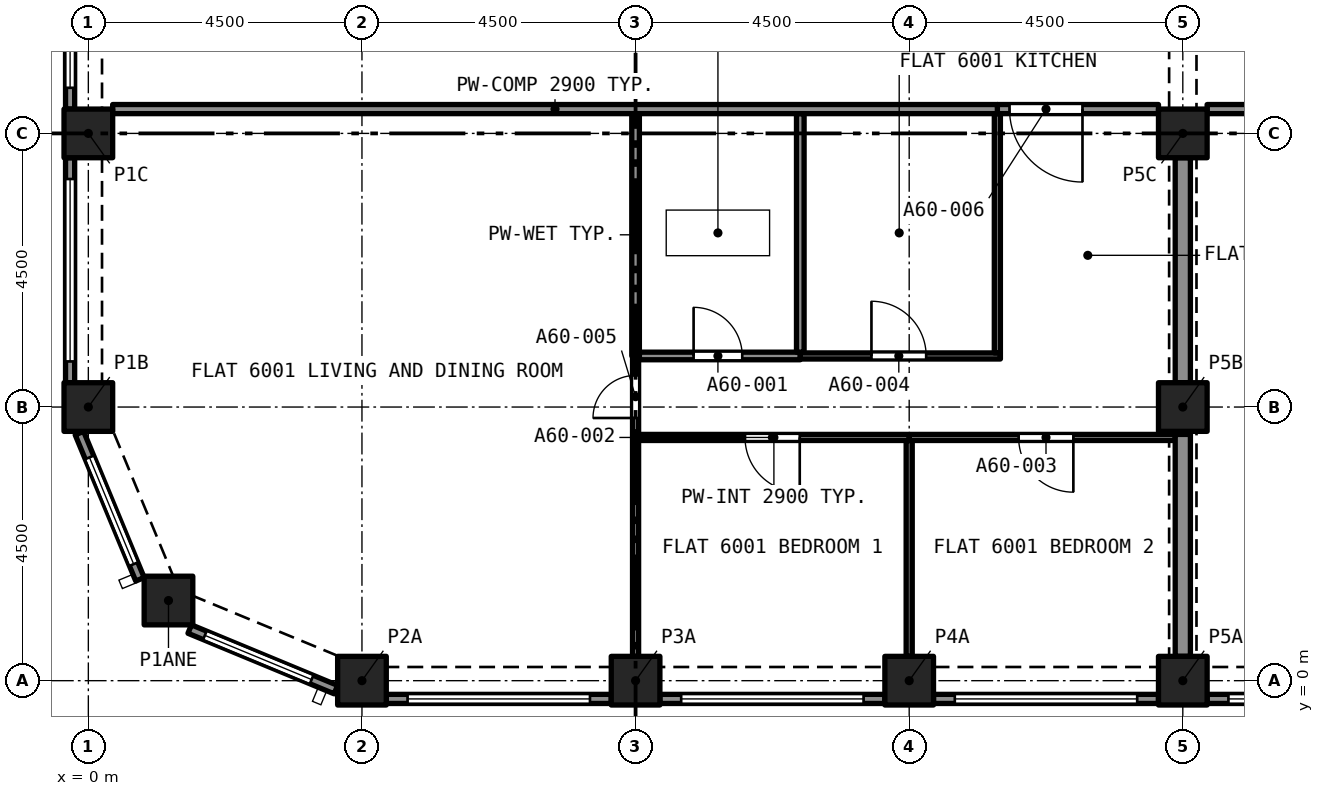
"""IFC4 building model, lengths in metres.
Left out: names, types, materials, properties, quantities, classifications, styles, units other than length and angle.
Written with IfcOpenShell. Run it as: python <this file> out.ifc"""

import sys

from ifc_helpers import new_model, si_unit, direction, frame, frame_2d, origin, origin_2d, place, context, subcontext, project, spatial, rectangle, extrude, element, fill, save


model = new_model("IFC4")
c1 = context("Model", 3, precision=1e-05, world=origin(), true_north=direction((0.0, 1.0)))
c2 = subcontext(c1, "Body", "Model", "MODEL_VIEW")
j1 = project(units=[si_unit("LENGTHUNIT", "METRE"), si_unit("PLANEANGLEUNIT", "RADIAN")], contexts=[c1])
p1 = place(None, origin())
s1 = spatial("IfcSite", under=j1, at=p1, CompositionType="ELEMENT")
p2 = place(p1, origin())
s2 = spatial("IfcBuilding", under=s1, at=p2, CompositionType="ELEMENT")
p3 = place(p2, frame((0.0, 0.0, 216.495)))
s3 = spatial("IfcBuildingStorey", under=s2, at=p3, CompositionType="ELEMENT", Elevation=216.495)
for number, where, z_axis, x_axis in (
    (1, (4.5, 0.0, 0.0), (0.0, 0.0, 1.0), (1.0, 0.0, 0.0)),
    (2, (9.0, 0.0, 0.0), (0.0, 0.0, 1.0), (1.0, 0.0, 0.0)),
    (3, (13.5, 0.0, 0.0), (0.0, 0.0, 1.0), (1.0, 0.0, 0.0)),
    (4, (18.0, 0.0, 0.0), (0.0, 0.0, 1.0), (1.0, 0.0, 0.0)),
    (5, (1.318, 1.318, 0.0), (0.0, 0.0, 1.0), (1.0, 0.0, 0.0)),
    (6, (0.0, 4.5, 0.0), (0.0, 0.0, 1.0), (1.0, 0.0, 0.0)),
    (7, (18.0, 4.5, 0.0), (0.0, 0.0, 1.0), (1.0, 0.0, 0.0)),
    (8, (0.0, 9.0, 0.0), (0.0, 0.0, 1.0), (1.0, 0.0, 0.0)),
    (9, (18.0, 9.0, 0.0), (0.0, 0.0, 1.0), (1.0, 0.0, 0.0)),
):
    element("IfcColumn", number, at=place(p3, frame(where, z_axis=z_axis, x_axis=x_axis)), inside=s3, PredefinedType="COLUMN", context=c2, shape_type="SweptSolid", body=[
        extrude(rectangle(XDim=0.8, YDim=0.8, at=origin_2d()), origin(), (0.0, 0.0, 1.0), 3.2),
    ])
p4 = place(p3, frame((-0.3, 9.4, 0.0), z_axis=(0.0, 0.0, 1.0), x_axis=(0.0, 1.0, 0.0)))
e10 = element("IfcWall", 10, at=p4, inside=s3, PredefinedType="SOLIDWALL", context=c2, shape_type="SweptSolid", body=[
    extrude(rectangle(XDim=3.7, YDim=0.15, at=frame_2d((1.85, 0.0))), origin(), (0.0, 0.0, 1.0), 3.2),
])
p5 = place(p4, frame((0.35, 0.0, 0.45)))
e11 = element("IfcOpeningElement", 11, at=p5, cuts=e10, PredefinedType="OPENING", context=c2, shape_type="SweptSolid", body=[
    extrude(rectangle(XDim=3.0, YDim=1.95, at=frame_2d((1.5, 0.975))), frame((0.0, 0.085, 0.0), z_axis=(0.0, -1.0, 0.0), x_axis=(1.0, 0.0, 0.0)), (0.0, 0.0, 1.0), 0.17),
])
p6 = place(p3, frame((-0.3, 4.9, 0.0), z_axis=(0.0, 0.0, 1.0), x_axis=(0.0, 1.0, 0.0)))
e12 = element("IfcWall", 12, at=p6, inside=s3, PredefinedType="SOLIDWALL", context=c2, shape_type="SweptSolid", body=[
    extrude(rectangle(XDim=3.7, YDim=0.15, at=frame_2d((1.85, 0.0))), origin(), (0.0, 0.0, 1.0), 3.2),
])
p7 = place(p6, frame((0.35, 0.0, 0.45)))
e13 = element("IfcOpeningElement", 13, at=p7, cuts=e12, PredefinedType="OPENING", context=c2, shape_type="SweptSolid", body=[
    extrude(rectangle(XDim=3.0, YDim=1.95, at=frame_2d((1.5, 0.975))), frame((0.0, 0.085, 0.0), z_axis=(0.0, -1.0, 0.0), x_axis=(1.0, 0.0, 0.0)), (0.0, 0.0, 1.0), 0.17),
])
p8 = place(p3, frame((0.849, 1.667, 0.0), z_axis=(0.0, 0.0, 1.0), x_axis=(-0.382669406082, 0.923885342263, 0.0)))
e14 = element("IfcWall", 14, at=p8, inside=s3, PredefinedType="SOLIDWALL", context=c2, shape_type="SweptSolid", body=[
    extrude(rectangle(XDim=2.602, YDim=0.15, at=frame_2d((1.301, 0.0))), origin(), (0.0, 0.0, 1.0), 3.2),
])
p9 = place(p8, frame((0.27, 0.0, 0.45)))
e15 = element("IfcOpeningElement", 15, at=p9, cuts=e14, PredefinedType="OPENING", context=c2, shape_type="SweptSolid", body=[
    extrude(rectangle(XDim=1.9, YDim=1.95, at=frame_2d((0.95, 0.975))), frame((0.0, 0.085, 0.0), z_axis=(0.0, -1.0, 0.0), x_axis=(1.0, 0.0, 0.0)), (0.0, 0.0, 1.0), 0.17),
])
p10 = place(p3, frame((4.071, -0.147, 0.0), z_axis=(0.0, 0.0, 1.0), x_axis=(-0.923885342263, 0.382669406082, 0.0)))
e16 = element("IfcWall", 16, at=p10, inside=s3, PredefinedType="SOLIDWALL", context=c2, shape_type="SweptSolid", body=[
    extrude(rectangle(XDim=2.602, YDim=0.15, at=frame_2d((1.301, 0.0))), origin(), (0.0, 0.0, 1.0), 3.2),
])
p11 = place(p10, frame((0.432, 0.0, 0.45)))
e17 = element("IfcOpeningElement", 17, at=p11, cuts=e16, PredefinedType="OPENING", context=c2, shape_type="SweptSolid", body=[
    extrude(rectangle(XDim=1.9, YDim=1.95, at=frame_2d((0.95, 0.975))), frame((0.0, 0.085, 0.0), z_axis=(0.0, -1.0, 0.0), x_axis=(1.0, 0.0, 0.0)), (0.0, 0.0, 1.0), 0.17),
])
p12 = place(p3, frame((8.6, -0.3, 0.0), z_axis=(0.0, 0.0, 1.0), x_axis=(-1.0, 0.0, 0.0)))
e18 = element("IfcWall", 18, at=p12, inside=s3, PredefinedType="SOLIDWALL", context=c2, shape_type="SweptSolid", body=[
    extrude(rectangle(XDim=3.7, YDim=0.15, at=frame_2d((1.85, 0.0))), origin(), (0.0, 0.0, 1.0), 3.2),
])
p13 = place(p12, frame((0.35, 0.0, 0.45)))
e19 = element("IfcOpeningElement", 19, at=p13, cuts=e18, PredefinedType="OPENING", context=c2, shape_type="SweptSolid", body=[
    extrude(rectangle(XDim=3.0, YDim=1.95, at=frame_2d((1.5, 0.975))), frame((0.0, 0.085, 0.0), z_axis=(0.0, -1.0, 0.0), x_axis=(1.0, 0.0, 0.0)), (0.0, 0.0, 1.0), 0.17),
])
p14 = place(p3, frame((13.1, -0.3, 0.0), z_axis=(0.0, 0.0, 1.0), x_axis=(-1.0, 0.0, 0.0)))
e20 = element("IfcWall", 20, at=p14, inside=s3, PredefinedType="SOLIDWALL", context=c2, shape_type="SweptSolid", body=[
    extrude(rectangle(XDim=3.7, YDim=0.15, at=frame_2d((1.85, 0.0))), origin(), (0.0, 0.0, 1.0), 3.2),
])
p15 = place(p14, frame((0.35, 0.0, 0.45)))
e21 = element("IfcOpeningElement", 21, at=p15, cuts=e20, PredefinedType="OPENING", context=c2, shape_type="SweptSolid", body=[
    extrude(rectangle(XDim=3.0, YDim=1.95, at=frame_2d((1.5, 0.975))), frame((0.0, 0.085, 0.0), z_axis=(0.0, -1.0, 0.0), x_axis=(1.0, 0.0, 0.0)), (0.0, 0.0, 1.0), 0.17),
])
p16 = place(p3, frame((17.6, -0.3, 0.0), z_axis=(0.0, 0.0, 1.0), x_axis=(-1.0, 0.0, 0.0)))
e22 = element("IfcWall", 22, at=p16, inside=s3, PredefinedType="SOLIDWALL", context=c2, shape_type="SweptSolid", body=[
    extrude(rectangle(XDim=3.7, YDim=0.15, at=frame_2d((1.85, 0.0))), origin(), (0.0, 0.0, 1.0), 3.2),
])
p17 = place(p16, frame((0.35, 0.0, 0.45)))
e23 = element("IfcOpeningElement", 23, at=p17, cuts=e22, PredefinedType="OPENING", context=c2, shape_type="SweptSolid", body=[
    extrude(rectangle(XDim=3.0, YDim=1.95, at=frame_2d((1.5, 0.975))), frame((0.0, 0.085, 0.0), z_axis=(0.0, -1.0, 0.0), x_axis=(1.0, 0.0, 0.0)), (0.0, 0.0, 1.0), 0.17),
])
p18 = place(p3, frame((22.1, -0.3, 0.0), z_axis=(0.0, 0.0, 1.0), x_axis=(-1.0, 0.0, 0.0)))
e24 = element("IfcWall", 24, at=p18, inside=s3, PredefinedType="SOLIDWALL", context=c2, shape_type="SweptSolid", body=[
    extrude(rectangle(XDim=3.7, YDim=0.15, at=frame_2d((1.85, 0.0))), origin(), (0.0, 0.0, 1.0), 3.2),
])
p19 = place(p18, frame((0.35, 0.0, 0.45)))
e25 = element("IfcOpeningElement", 25, at=p19, cuts=e24, PredefinedType="OPENING", context=c2, shape_type="SweptSolid", body=[
    extrude(rectangle(XDim=3.0, YDim=1.95, at=frame_2d((1.5, 0.975))), frame((0.0, 0.085, 0.0), z_axis=(0.0, -1.0, 0.0), x_axis=(1.0, 0.0, 0.0)), (0.0, 0.0, 1.0), 0.17),
])
p20 = place(p3, frame((9.062, 5.34, 0.0), z_axis=(0.0, 0.0, 1.0), x_axis=(1.0, 0.0, 0.0)))
e26 = element("IfcWall", 26, at=p20, inside=s3, PredefinedType="PARTITIONING", context=c2, shape_type="SweptSolid", body=[
    extrude(rectangle(XDim=2.646, YDim=0.125, at=frame_2d((1.323, 0.0))), origin(), (0.0, 0.0, 1.0), 2.9),
])
p21 = place(p20, frame((0.892, 0.0, 0.0)))
e27 = element("IfcOpeningElement", 27, at=p21, cuts=e26, PredefinedType="OPENING", context=c2, shape_type="SweptSolid", body=[
    extrude(rectangle(XDim=0.8, YDim=2.1, at=frame_2d((0.4, 1.05))), frame((0.0, 0.073, 0.0), z_axis=(0.0, -1.0, 0.0), x_axis=(1.0, 0.0, 0.0)), (0.0, 0.0, 1.0), 0.145),
])
p22 = place(p3, frame((11.709, 5.403, 0.0), z_axis=(0.0, 0.0, 1.0), x_axis=(0.0, 1.0, 0.0)))
e28 = element("IfcWall", 28, at=p22, inside=s3, PredefinedType="PARTITIONING", context=c2, shape_type="SweptSolid", body=[
    extrude(rectangle(XDim=3.922, YDim=0.125, at=frame_2d((1.961, 0.0))), origin(), (0.0, 0.0, 1.0), 2.9),
])
p23 = place(p3, frame((9.0, 5.34, 0.0), z_axis=(0.0, 0.0, 1.0), x_axis=(0.0, 1.0, 0.0)))
e29 = element("IfcWall", 29, at=p23, inside=s3, PredefinedType="PARTITIONING", context=c2, shape_type="SweptSolid", body=[
    extrude(rectangle(XDim=3.985, YDim=0.125, at=frame_2d((1.992, 0.0))), origin(), (0.0, 0.0, 1.0), 2.9),
])
p24 = place(p3, frame((13.5, 0.4, 0.0), z_axis=(0.0, 0.0, 1.0), x_axis=(0.0, 1.0, 0.0)))
e30 = element("IfcWall", 30, at=p24, inside=s3, PredefinedType="PARTITIONING", context=c2, shape_type="SweptSolid", body=[
    extrude(rectangle(XDim=3.55, YDim=0.1, at=frame_2d((1.775, 0.0))), origin(), (0.0, 0.0, 1.0), 2.9),
])
p25 = place(p3, frame((13.5, 4.0, 0.0), z_axis=(0.0, 0.0, 1.0), x_axis=(-1.0, 0.0, 0.0)))
e31 = element("IfcWall", 31, at=p25, inside=s3, PredefinedType="PARTITIONING", context=c2, shape_type="SweptSolid", body=[
    extrude(rectangle(XDim=4.45, YDim=0.1, at=frame_2d((2.225, 0.0))), origin(), (0.0, 0.0, 1.0), 2.9),
])
p26 = place(p25, frame((1.8, 0.0, 0.0)))
e32 = element("IfcOpeningElement", 32, at=p26, cuts=e31, PredefinedType="OPENING", context=c2, shape_type="SweptSolid", body=[
    extrude(rectangle(XDim=0.9, YDim=2.1, at=frame_2d((0.45, 1.05))), frame((0.0, 0.06, 0.0), z_axis=(0.0, -1.0, 0.0), x_axis=(1.0, 0.0, 0.0)), (0.0, 0.0, 1.0), 0.12),
])
p27 = place(p3, frame((9.0, 0.4, 0.0), z_axis=(0.0, 0.0, 1.0), x_axis=(0.0, 1.0, 0.0)))
e33 = element("IfcWall", 33, at=p27, inside=s3, PredefinedType="PARTITIONING", context=c2, shape_type="SweptSolid", body=[
    extrude(rectangle(XDim=3.6, YDim=0.1, at=frame_2d((1.8, 0.0))), origin(), (0.0, 0.0, 1.0), 2.9),
])
p28 = place(p3, frame((17.875, 4.0, 0.0), z_axis=(0.0, 0.0, 1.0), x_axis=(-1.0, 0.0, 0.0)))
e34 = element("IfcWall", 34, at=p28, inside=s3, PredefinedType="PARTITIONING", context=c2, shape_type="SweptSolid", body=[
    extrude(rectangle(XDim=4.375, YDim=0.1, at=frame_2d((2.188, 0.0))), origin(), (0.0, 0.0, 1.0), 2.9),
])
p29 = place(p28, frame((1.675, 0.0, 0.0)))
e35 = element("IfcOpeningElement", 35, at=p29, cuts=e34, PredefinedType="OPENING", context=c2, shape_type="SweptSolid", body=[
    extrude(rectangle(XDim=0.9, YDim=2.1, at=frame_2d((0.45, 1.05))), frame((0.0, 0.06, 0.0), z_axis=(0.0, -1.0, 0.0), x_axis=(1.0, 0.0, 0.0)), (0.0, 0.0, 1.0), 0.12),
])
p30 = place(p3, frame((18.0, 0.4, 0.0), z_axis=(0.0, 0.0, 1.0), x_axis=(0.0, 1.0, 0.0)))
e36 = element("IfcWall", 36, at=p30, inside=s3, PredefinedType="PARTITIONING", context=c2, shape_type="SweptSolid", body=[
    extrude(rectangle(XDim=3.65, YDim=0.25, at=frame_2d((1.825, 0.0))), origin(), (0.0, 0.0, 1.0), 2.38),
])
p31 = place(p3, frame((11.708, 5.34, 0.0), z_axis=(0.0, 0.0, 1.0), x_axis=(1.0, 0.0, 0.0)))
e37 = element("IfcWall", 37, at=p31, inside=s3, PredefinedType="PARTITIONING", context=c2, shape_type="SweptSolid", body=[
    extrude(rectangle(XDim=3.292, YDim=0.1, at=frame_2d((1.646, 0.0))), origin(), (0.0, 0.0, 1.0), 2.9),
])
p32 = place(p31, frame((1.171, 0.0, 0.0)))
e38 = element("IfcOpeningElement", 38, at=p32, cuts=e37, PredefinedType="OPENING", context=c2, shape_type="SweptSolid", body=[
    extrude(rectangle(XDim=0.9, YDim=2.1, at=frame_2d((0.45, 1.05))), frame((0.0, 0.06, 0.0), z_axis=(0.0, -1.0, 0.0), x_axis=(1.0, 0.0, 0.0)), (0.0, 0.0, 1.0), 0.12),
])
p33 = place(p3, frame((14.95, 5.39, 0.0), z_axis=(0.0, 0.0, 1.0), x_axis=(0.0, 1.0, 0.0)))
e39 = element("IfcWall", 39, at=p33, inside=s3, PredefinedType="PARTITIONING", context=c2, shape_type="SweptSolid", body=[
    extrude(rectangle(XDim=3.935, YDim=0.1, at=frame_2d((1.968, 0.0))), origin(), (0.0, 0.0, 1.0), 2.9),
])
p34 = place(p3, frame((9.0, 4.0, 0.0), z_axis=(0.0, 0.0, 1.0), x_axis=(0.0, 1.0, 0.0)))
e40 = element("IfcWall", 40, at=p34, inside=s3, PredefinedType="PARTITIONING", context=c2, shape_type="SweptSolid", body=[
    extrude(rectangle(XDim=1.34, YDim=0.1, at=frame_2d((0.67, 0.0))), origin(), (0.0, 0.0, 1.0), 2.9),
])
p35 = place(p34, frame((0.32, 0.0, 0.0)))
e41 = element("IfcOpeningElement", 41, at=p35, cuts=e40, PredefinedType="OPENING", context=c2, shape_type="SweptSolid", body=[
    extrude(rectangle(XDim=0.7, YDim=2.1, at=frame_2d((0.35, 1.05))), frame((0.0, 0.06, 0.0), z_axis=(0.0, -1.0, 0.0), x_axis=(1.0, 0.0, 0.0)), (0.0, 0.0, 1.0), 0.12),
])
p36 = place(p3, frame((18.0, 4.9, 0.0), z_axis=(0.0, 0.0, 1.0), x_axis=(0.0, 1.0, 0.0)))
e42 = element("IfcWall", 42, at=p36, inside=s3, PredefinedType="PARTITIONING", context=c2, shape_type="SweptSolid", body=[
    extrude(rectangle(XDim=3.7, YDim=0.25, at=frame_2d((1.85, 0.0))), origin(), (0.0, 0.0, 1.0), 2.38),
])
p37 = place(p3, frame((17.6, 9.4, 0.0), z_axis=(0.0, 0.0, 1.0), x_axis=(-1.0, 0.0, 0.0)))
e43 = element("IfcWall", 43, at=p37, inside=s3, PredefinedType="PARTITIONING", context=c2, shape_type="SweptSolid", body=[
    extrude(rectangle(XDim=2.65, YDim=0.15, at=frame_2d((1.325, 0.0))), origin(), (0.0, 0.0, 1.0), 2.9),
])
p38 = place(p37, frame((1.25, 0.0, 0.0)))
e44 = element("IfcOpeningElement", 44, at=p38, cuts=e43, PredefinedType="OPENING", context=c2, shape_type="SweptSolid", body=[
    extrude(rectangle(XDim=1.2, YDim=2.4, at=frame_2d((0.6, 1.2))), frame((0.0, 0.085, 0.0), z_axis=(0.0, -1.0, 0.0), x_axis=(1.0, 0.0, 0.0)), (0.0, 0.0, 1.0), 0.17),
])
p39 = place(p3, frame((0.4, 9.4, 0.0), z_axis=(0.0, 0.0, 1.0), x_axis=(1.0, 0.0, 0.0)))
e45 = element("IfcWall", 45, at=p39, inside=s3, PredefinedType="PARTITIONING", context=c2, shape_type="SweptSolid", body=[
    extrude(rectangle(XDim=14.55, YDim=0.15, at=frame_2d((7.275, 0.0))), origin(), (0.0, 0.0, 1.0), 2.9),
])
p40 = place(p3, frame((31.1, 9.4, 0.0), z_axis=(0.0, 0.0, 1.0), x_axis=(-1.0, 0.0, 0.0)))
e46 = element("IfcWall", 46, at=p40, inside=s3, PredefinedType="PARTITIONING", context=c2, shape_type="SweptSolid", body=[
    extrude(rectangle(XDim=12.7, YDim=0.15, at=frame_2d((6.35, 0.0))), origin(), (0.0, 0.0, 1.0), 2.75),
])
p41 = place(p40, frame((6.05, 0.0, 0.0)))
e47 = element("IfcOpeningElement", 47, at=p41, cuts=e46, PredefinedType="OPENING", context=c2, shape_type="SweptSolid", body=[
    extrude(rectangle(XDim=1.0, YDim=2.1, at=frame_2d((0.5, 1.05))), frame((0.0, 0.085, 0.0), z_axis=(0.0, -1.0, 0.0), x_axis=(1.0, 0.0, 0.0)), (0.0, 0.0, 1.0), 0.17),
])
p42 = place(p5, origin())
e48 = element("IfcWindow", 48, at=p42, inside=s3, PartitioningType="SINGLE_PANEL", PredefinedType="WINDOW", context=c2, shape_type="SweptSolid", body=[
    extrude(rectangle(XDim=3.0, YDim=1.95, at=frame_2d((1.5, 0.975))), frame((0.0, 0.03, 0.0), z_axis=(0.0, -1.0, 0.0), x_axis=(1.0, 0.0, 0.0)), (0.0, 0.0, 1.0), 0.06),
])
fill(e11, e48)
p43 = place(p7, origin())
e49 = element("IfcWindow", 49, at=p43, inside=s3, PartitioningType="SINGLE_PANEL", PredefinedType="WINDOW", context=c2, shape_type="SweptSolid", body=[
    extrude(rectangle(XDim=3.0, YDim=1.95, at=frame_2d((1.5, 0.975))), frame((0.0, 0.03, 0.0), z_axis=(0.0, -1.0, 0.0), x_axis=(1.0, 0.0, 0.0)), (0.0, 0.0, 1.0), 0.06),
])
fill(e13, e49)
p44 = place(p9, origin())
e50 = element("IfcWindow", 50, at=p44, inside=s3, PartitioningType="SINGLE_PANEL", PredefinedType="WINDOW", context=c2, shape_type="SweptSolid", body=[
    extrude(rectangle(XDim=1.9, YDim=1.95, at=frame_2d((0.95, 0.975))), frame((0.0, 0.03, 0.0), z_axis=(0.0, -1.0, 0.0), x_axis=(1.0, 0.0, 0.0)), (0.0, 0.0, 1.0), 0.06),
])
fill(e15, e50)
p45 = place(p11, origin())
e51 = element("IfcWindow", 51, at=p45, inside=s3, PartitioningType="SINGLE_PANEL", PredefinedType="WINDOW", context=c2, shape_type="SweptSolid", body=[
    extrude(rectangle(XDim=1.9, YDim=1.95, at=frame_2d((0.95, 0.975))), frame((0.0, 0.03, 0.0), z_axis=(0.0, -1.0, 0.0), x_axis=(1.0, 0.0, 0.0)), (0.0, 0.0, 1.0), 0.06),
])
fill(e17, e51)
p46 = place(p13, origin())
e52 = element("IfcWindow", 52, at=p46, inside=s3, PartitioningType="SINGLE_PANEL", PredefinedType="WINDOW", context=c2, shape_type="SweptSolid", body=[
    extrude(rectangle(XDim=3.0, YDim=1.95, at=frame_2d((1.5, 0.975))), frame((0.0, 0.03, 0.0), z_axis=(0.0, -1.0, 0.0), x_axis=(1.0, 0.0, 0.0)), (0.0, 0.0, 1.0), 0.06),
])
fill(e19, e52)
p47 = place(p15, origin())
e53 = element("IfcWindow", 53, at=p47, inside=s3, PartitioningType="SINGLE_PANEL", PredefinedType="WINDOW", context=c2, shape_type="SweptSolid", body=[
    extrude(rectangle(XDim=3.0, YDim=1.95, at=frame_2d((1.5, 0.975))), frame((0.0, 0.03, 0.0), z_axis=(0.0, -1.0, 0.0), x_axis=(1.0, 0.0, 0.0)), (0.0, 0.0, 1.0), 0.06),
])
fill(e21, e53)
p48 = place(p17, origin())
e54 = element("IfcWindow", 54, at=p48, inside=s3, PartitioningType="SINGLE_PANEL", PredefinedType="WINDOW", context=c2, shape_type="SweptSolid", body=[
    extrude(rectangle(XDim=3.0, YDim=1.95, at=frame_2d((1.5, 0.975))), frame((0.0, 0.03, 0.0), z_axis=(0.0, -1.0, 0.0), x_axis=(1.0, 0.0, 0.0)), (0.0, 0.0, 1.0), 0.06),
])
fill(e23, e54)
p49 = place(p19, origin())
e55 = element("IfcWindow", 55, at=p49, inside=s3, PartitioningType="SINGLE_PANEL", PredefinedType="WINDOW", context=c2, shape_type="SweptSolid", body=[
    extrude(rectangle(XDim=3.0, YDim=1.95, at=frame_2d((1.5, 0.975))), frame((0.0, 0.03, 0.0), z_axis=(0.0, -1.0, 0.0), x_axis=(1.0, 0.0, 0.0)), (0.0, 0.0, 1.0), 0.06),
])
fill(e25, e55)
p50 = place(p21, origin())
e56 = element("IfcDoor", 56, at=p50, inside=s3, OperationType="SINGLE_SWING_LEFT", PredefinedType="DOOR", context=c2, shape_type="SweptSolid", body=[
    extrude(rectangle(XDim=0.8, YDim=2.1, at=frame_2d((0.4, 1.05))), frame((0.0, 0.025, 0.0), z_axis=(0.0, -1.0, 0.0), x_axis=(1.0, 0.0, 0.0)), (0.0, 0.0, 1.0), 0.05),
])
fill(e27, e56)
p51 = place(p26, origin())
e57 = element("IfcDoor", 57, at=p51, inside=s3, OperationType="SINGLE_SWING_RIGHT", PredefinedType="DOOR", context=c2, shape_type="SweptSolid", body=[
    extrude(rectangle(XDim=0.9, YDim=2.1, at=frame_2d((0.45, 1.05))), frame((0.0, 0.025, 0.0), z_axis=(0.0, -1.0, 0.0), x_axis=(1.0, 0.0, 0.0)), (0.0, 0.0, 1.0), 0.05),
])
fill(e32, e57)
p52 = place(p29, origin())
e58 = element("IfcDoor", 58, at=p52, inside=s3, OperationType="SINGLE_SWING_LEFT", PredefinedType="DOOR", context=c2, shape_type="SweptSolid", body=[
    extrude(rectangle(XDim=0.9, YDim=2.1, at=frame_2d((0.45, 1.05))), frame((0.0, 0.025, 0.0), z_axis=(0.0, -1.0, 0.0), x_axis=(1.0, 0.0, 0.0)), (0.0, 0.0, 1.0), 0.05),
])
fill(e35, e58)
p53 = place(p32, origin())
e59 = element("IfcDoor", 59, at=p53, inside=s3, OperationType="SINGLE_SWING_LEFT", PredefinedType="DOOR", context=c2, shape_type="SweptSolid", body=[
    extrude(rectangle(XDim=0.9, YDim=2.1, at=frame_2d((0.45, 1.05))), frame((0.0, 0.025, 0.0), z_axis=(0.0, -1.0, 0.0), x_axis=(1.0, 0.0, 0.0)), (0.0, 0.0, 1.0), 0.05),
])
fill(e38, e59)
p54 = place(p35, origin())
e60 = element("IfcDoor", 60, at=p54, inside=s3, OperationType="SINGLE_SWING_RIGHT", PredefinedType="DOOR", context=c2, shape_type="SweptSolid", body=[
    extrude(rectangle(XDim=0.7, YDim=2.1, at=frame_2d((0.35, 1.05))), frame((0.0, 0.025, 0.0), z_axis=(0.0, -1.0, 0.0), x_axis=(1.0, 0.0, 0.0)), (0.0, 0.0, 1.0), 0.05),
])
fill(e41, e60)
p55 = place(p38, origin())
e61 = element("IfcDoor", 61, at=p55, inside=s3, OperationType="SINGLE_SWING_RIGHT", PredefinedType="DOOR", context=c2, shape_type="SweptSolid", body=[
    extrude(rectangle(XDim=1.2, YDim=2.4, at=frame_2d((0.6, 1.2))), frame((0.0, 0.025, 0.0), z_axis=(0.0, -1.0, 0.0), x_axis=(1.0, 0.0, 0.0)), (0.0, 0.0, 1.0), 0.05),
])
fill(e44, e61)
save(model, sys.argv[1])
